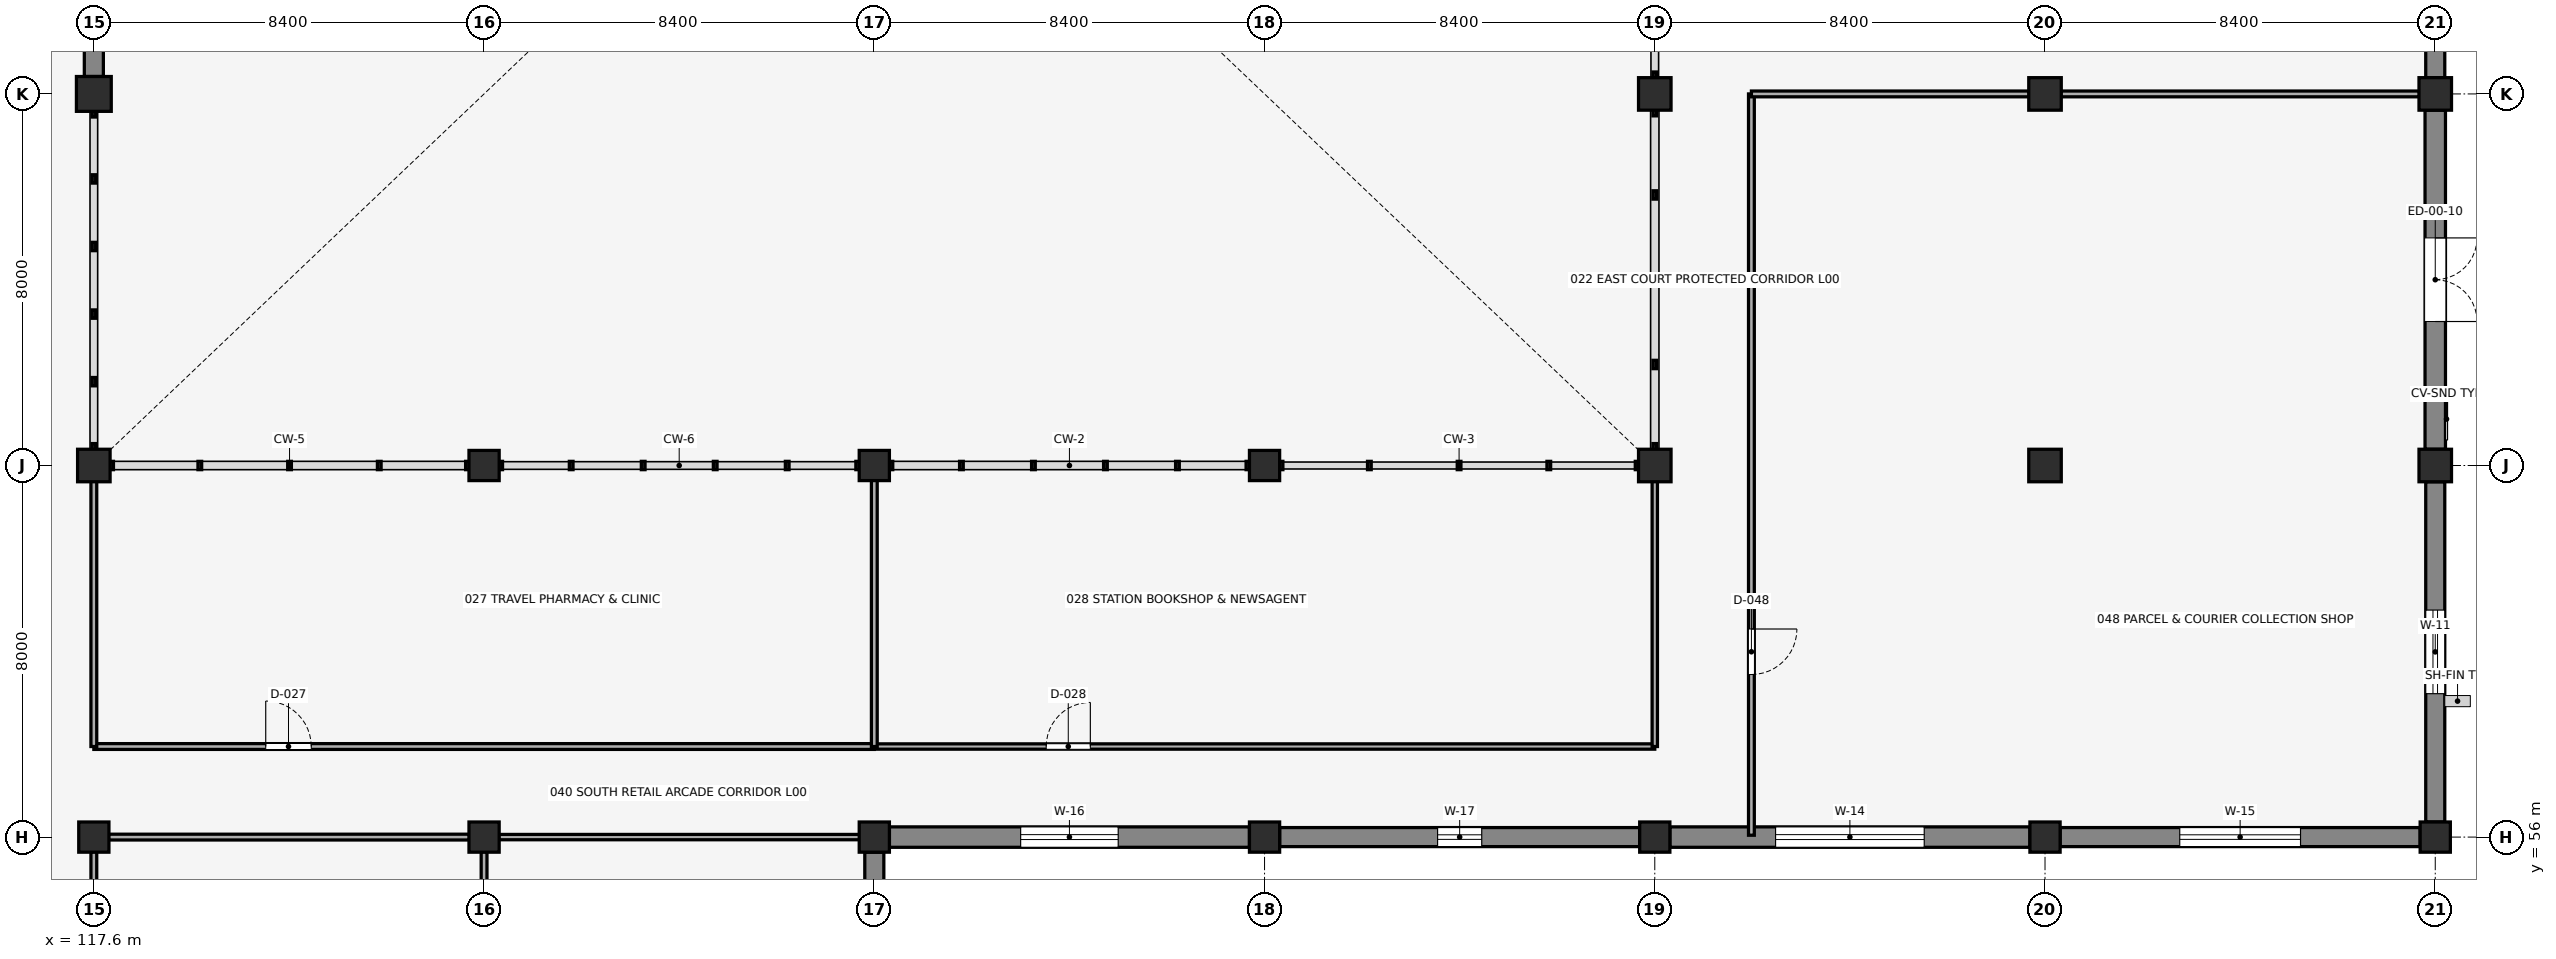
"""IFC4 building model, lengths in metres.
Left out: names, types, materials, properties, quantities, classifications, styles, units other than length and angle.
Written with IfcOpenShell. Run it as: python <this file> out.ifc"""

import sys

from ifc_helpers import new_model, si_unit, direction, frame, frame_2d, origin, origin_2d, place, context, subcontext, project, spatial, rectangle, circle, extrude, element, fill, save


model = new_model("IFC4")
c1 = context("Model", 3, precision=1e-05, world=origin(), true_north=direction((0.0, 1.0)))
c2 = subcontext(c1, "Body", "Model", "MODEL_VIEW")
j1 = project(units=[si_unit("LENGTHUNIT", "METRE"), si_unit("PLANEANGLEUNIT", "RADIAN")], contexts=[c1])
p1 = place(None, origin())
s1 = spatial("IfcSite", under=j1, at=p1, CompositionType="ELEMENT")
p2 = place(p1, origin())
s2 = spatial("IfcBuilding", under=s1, at=p2, CompositionType="ELEMENT")
p3 = place(p2, origin())
s3 = spatial("IfcBuildingStorey", under=s2, at=p3, CompositionType="ELEMENT", Elevation=0.0)
p4 = place(p3, frame((117.6, 56.0, 0.0), z_axis=(0.0, 0.0, 1.0), x_axis=(1.0, 0.0, 0.0)))
e1 = element("IfcColumn", 1, at=p4, inside=s3, PredefinedType="COLUMN", context=c2, shape_type="SweptSolid", body=[
    extrude(circle(Radius=0.325, at=origin_2d()), origin(), (0.0, 0.0, 1.0), 5.15),
])
p5 = place(p3, frame((117.6, 64.0, 0.0), z_axis=(0.0, 0.0, 1.0), x_axis=(1.0, 0.0, 0.0)))
e2 = element("IfcColumn", 2, at=p5, inside=s3, PredefinedType="COLUMN", context=c2, shape_type="SweptSolid", body=[
    extrude(rectangle(XDim=0.7, YDim=0.7, at=origin_2d()), origin(), (0.0, 0.0, 1.0), 5.15),
])
p6 = place(p3, frame((117.6, 72.0, 0.0), z_axis=(0.0, 0.0, 1.0), x_axis=(1.0, 0.0, 0.0)))
e3 = element("IfcColumn", 3, at=p6, inside=s3, PredefinedType="COLUMN", context=c2, shape_type="SweptSolid", body=[
    extrude(rectangle(XDim=0.75, YDim=0.75, at=origin_2d()), origin(), (0.0, 0.0, 1.0), 5.15),
])
for number, where, z_axis, x_axis in (
    (4, (126.0, 56.0, 0.0), (0.0, 0.0, 1.0), (1.0, 0.0, 0.0)),
    (5, (126.0, 64.0, 0.0), (0.0, 0.0, 1.0), (1.0, 0.0, 0.0)),
    (6, (134.4, 56.0, 0.0), (0.0, 0.0, 1.0), (1.0, 0.0, 0.0)),
    (7, (134.4, 64.0, 0.0), (0.0, 0.0, 1.0), (1.0, 0.0, 0.0)),
    (8, (142.8, 56.0, 0.0), (0.0, 0.0, 1.0), (1.0, 0.0, 0.0)),
    (9, (142.8, 64.0, 0.0), (0.0, 0.0, 1.0), (1.0, 0.0, 0.0)),
):
    element("IfcColumn", number, at=place(p3, frame(where, z_axis=z_axis, x_axis=x_axis)), inside=s3, PredefinedType="COLUMN", context=c2, shape_type="SweptSolid", body=[
        extrude(circle(Radius=0.325, at=origin_2d()), origin(), (0.0, 0.0, 1.0), 5.15),
    ])
p7 = place(p3, frame((151.2, 56.0, 0.0), z_axis=(0.0, 0.0, 1.0), x_axis=(1.0, 0.0, 0.0)))
e10 = element("IfcColumn", 10, at=p7, inside=s3, PredefinedType="COLUMN", context=c2, shape_type="SweptSolid", body=[
    extrude(rectangle(XDim=0.65, YDim=0.65, at=origin_2d()), origin(), (0.0, 0.0, 1.0), 5.15),
])
for number, where, z_axis, x_axis in (
    (11, (151.2, 64.0, 0.0), (0.0, 0.0, 1.0), (1.0, 0.0, 0.0)),
    (12, (151.2, 72.0, 0.0), (0.0, 0.0, 1.0), (1.0, 0.0, 0.0)),
):
    element("IfcColumn", number, at=place(p3, frame(where, z_axis=z_axis, x_axis=x_axis)), inside=s3, PredefinedType="COLUMN", context=c2, shape_type="SweptSolid", body=[
        extrude(rectangle(XDim=0.7, YDim=0.7, at=origin_2d()), origin(), (0.0, 0.0, 1.0), 5.15),
    ])
p8 = place(p3, frame((159.6, 56.0, 0.0), z_axis=(0.0, 0.0, 1.0), x_axis=(1.0, 0.0, 0.0)))
e13 = element("IfcColumn", 13, at=p8, inside=s3, PredefinedType="COLUMN", context=c2, shape_type="SweptSolid", body=[
    extrude(rectangle(XDim=0.65, YDim=0.65, at=origin_2d()), origin(), (0.0, 0.0, 1.0), 5.15),
])
for number, where, z_axis, x_axis in (
    (14, (159.6, 64.0, 0.0), (0.0, 0.0, 1.0), (1.0, 0.0, 0.0)),
    (15, (159.6, 72.0, 0.0), (0.0, 0.0, 1.0), (1.0, 0.0, 0.0)),
):
    element("IfcColumn", number, at=place(p3, frame(where, z_axis=z_axis, x_axis=x_axis)), inside=s3, PredefinedType="COLUMN", context=c2, shape_type="SweptSolid", body=[
        extrude(rectangle(XDim=0.7, YDim=0.7, at=origin_2d()), origin(), (0.0, 0.0, 1.0), 5.15),
    ])
p9 = place(p3, frame((168.0, 56.0, 0.0), z_axis=(0.0, 0.0, 1.0), x_axis=(1.0, 0.0, 0.0)))
e16 = element("IfcColumn", 16, at=p9, inside=s3, PredefinedType="COLUMN", context=c2, shape_type="SweptSolid", body=[
    extrude(rectangle(XDim=0.65, YDim=0.65, at=origin_2d()), origin(), (0.0, 0.0, 1.0), 5.15),
])
for number, where, z_axis, x_axis in (
    (17, (168.0, 64.0, 0.0), (0.0, 0.0, 1.0), (1.0, 0.0, 0.0)),
    (18, (168.0, 72.0, 0.0), (0.0, 0.0, 1.0), (1.0, 0.0, 0.0)),
):
    element("IfcColumn", number, at=place(p3, frame(where, z_axis=z_axis, x_axis=x_axis)), inside=s3, PredefinedType="COLUMN", context=c2, shape_type="SweptSolid", body=[
        extrude(rectangle(XDim=0.7, YDim=0.7, at=origin_2d()), origin(), (0.0, 0.0, 1.0), 5.15),
    ])
p10 = place(p3, frame((168.0, 56.325, 0.0), z_axis=(0.0, 0.0, 1.0), x_axis=(0.0, 1.0, 0.0)))
e19 = element("IfcWall", 19, at=p10, inside=s3, PredefinedType="SOLIDWALL", context=c2, shape_type="SweptSolid", body=[
    extrude(rectangle(XDim=7.325, YDim=0.41, at=frame_2d((3.663, 0.0))), origin(), (0.0, 0.0, 1.0), 4.747),
])
p11 = place(p10, frame((2.762, 0.0, 0.9), z_axis=(0.0, 0.0, 1.0), x_axis=(1.0, 0.0, 0.0)))
e20 = element("IfcOpeningElement", 20, at=p11, cuts=e19, PredefinedType="OPENING", context=c2, shape_type="SweptSolid", body=[
    extrude(rectangle(XDim=1.8, YDim=1.45, at=frame_2d((0.9, 0.725))), frame((0.0, 0.215, 0.0), z_axis=(0.0, -1.0, 0.0), x_axis=(1.0, 0.0, 0.0)), (0.0, 0.0, 1.0), 0.43),
])
p12 = place(p3, frame((168.0, 64.35, 0.0), z_axis=(0.0, 0.0, 1.0), x_axis=(0.0, 1.0, 0.0)))
e21 = element("IfcWall", 21, at=p12, inside=s3, PredefinedType="SOLIDWALL", context=c2, shape_type="SweptSolid", body=[
    extrude(rectangle(XDim=7.3, YDim=0.44, at=frame_2d((3.65, 0.0))), origin(), (0.0, 0.0, 1.0), 4.747),
])
p13 = place(p12, frame((4.55, 0.0, 0.0), z_axis=(0.0, 0.0, 1.0), x_axis=(-1.0, 0.0, 0.0)))
e22 = element("IfcOpeningElement", 22, at=p13, cuts=e21, PredefinedType="OPENING", context=c2, shape_type="SweptSolid", body=[
    extrude(rectangle(XDim=1.8, YDim=2.2, at=frame_2d((0.9, 1.1))), frame((0.0, 0.23, 0.0), z_axis=(0.0, -1.0, 0.0), x_axis=(1.0, 0.0, 0.0)), (0.0, 0.0, 1.0), 0.46),
])
p14 = place(p3, frame((168.0, 72.35, 0.0), z_axis=(0.0, 0.0, 1.0), x_axis=(0.0, 1.0, 0.0)))
e23 = element("IfcWall", 23, at=p14, inside=s3, PredefinedType="SOLIDWALL", context=c2, shape_type="SweptSolid", body=[
    extrude(rectangle(XDim=7.3, YDim=0.41, at=frame_2d((3.65, 0.0))), origin(), (0.0, 0.0, 1.0), 4.85),
])
p15 = place(p3, frame((151.525, 56.0, 0.0), z_axis=(0.0, 0.0, 1.0), x_axis=(1.0, 0.0, 0.0)))
e24 = element("IfcWall", 24, at=p15, inside=s3, PredefinedType="SOLIDWALL", context=c2, shape_type="SweptSolid", body=[
    extrude(rectangle(XDim=7.75, YDim=0.44, at=frame_2d((3.875, 0.0))), origin(), (0.0, 0.0, 1.0), 4.74),
])
p16 = place(p15, frame((2.275, 0.0, 1.55), z_axis=(0.0, 0.0, 1.0), x_axis=(1.0, 0.0, 0.0)))
e25 = element("IfcOpeningElement", 25, at=p16, cuts=e24, PredefinedType="OPENING", context=c2, shape_type="SweptSolid", body=[
    extrude(rectangle(XDim=3.2, YDim=0.9, at=frame_2d((1.6, 0.45))), frame((0.0, 0.23, 0.0), z_axis=(0.0, -1.0, 0.0), x_axis=(1.0, 0.0, 0.0)), (0.0, 0.0, 1.0), 0.46),
])
p17 = place(p3, frame((159.925, 56.0, 0.0), z_axis=(0.0, 0.0, 1.0), x_axis=(1.0, 0.0, 0.0)))
e26 = element("IfcWall", 26, at=p17, inside=s3, PredefinedType="SOLIDWALL", context=c2, shape_type="SweptSolid", body=[
    extrude(rectangle(XDim=7.75, YDim=0.41, at=frame_2d((3.875, 0.0))), origin(), (0.0, 0.0, 1.0), 4.74),
])
p18 = place(p17, frame((2.575, 0.0, 1.55), z_axis=(0.0, 0.0, 1.0), x_axis=(1.0, 0.0, 0.0)))
e27 = element("IfcOpeningElement", 27, at=p18, cuts=e26, PredefinedType="OPENING", context=c2, shape_type="SweptSolid", body=[
    extrude(rectangle(XDim=2.6, YDim=0.85, at=frame_2d((1.3, 0.425))), frame((0.0, 0.215, 0.0), z_axis=(0.0, -1.0, 0.0), x_axis=(1.0, 0.0, 0.0)), (0.0, 0.0, 1.0), 0.43),
])
p19 = place(p3, frame((134.725, 56.0, 0.0), z_axis=(0.0, 0.0, 1.0), x_axis=(1.0, 0.0, 0.0)))
e28 = element("IfcWall", 28, at=p19, inside=s3, PredefinedType="SOLIDWALL", context=c2, shape_type="SweptSolid", body=[
    extrude(rectangle(XDim=7.75, YDim=0.44, at=frame_2d((3.875, 0.0))), origin(), (0.0, 0.0, 1.0), 4.74),
])
p20 = place(p19, frame((2.825, 0.0, 1.55), z_axis=(0.0, 0.0, 1.0), x_axis=(1.0, 0.0, 0.0)))
e29 = element("IfcOpeningElement", 29, at=p20, cuts=e28, PredefinedType="OPENING", context=c2, shape_type="SweptSolid", body=[
    extrude(rectangle(XDim=2.1, YDim=0.8, at=frame_2d((1.05, 0.4))), frame((0.0, 0.23, 0.0), z_axis=(0.0, -1.0, 0.0), x_axis=(1.0, 0.0, 0.0)), (0.0, 0.0, 1.0), 0.46),
])
p21 = place(p3, frame((143.125, 56.0, 0.0), z_axis=(0.0, 0.0, 1.0), x_axis=(1.0, 0.0, 0.0)))
e30 = element("IfcWall", 30, at=p21, inside=s3, PredefinedType="SOLIDWALL", context=c2, shape_type="SweptSolid", body=[
    extrude(rectangle(XDim=7.75, YDim=0.41, at=frame_2d((3.875, 0.0))), origin(), (0.0, 0.0, 1.0), 4.74),
])
p22 = place(p21, frame((3.4, 0.0, 0.65), z_axis=(0.0, 0.0, 1.0), x_axis=(1.0, 0.0, 0.0)))
e31 = element("IfcOpeningElement", 31, at=p22, cuts=e30, PredefinedType="OPENING", context=c2, shape_type="SweptSolid", body=[
    extrude(rectangle(XDim=0.95, YDim=2.1, at=frame_2d((0.475, 1.05))), frame((0.0, 0.215, 0.0), z_axis=(0.0, -1.0, 0.0), x_axis=(1.0, 0.0, 0.0)), (0.0, 0.0, 1.0), 0.43),
])
p23 = place(p3, frame((134.4, 48.325, 0.0), z_axis=(0.0, 0.0, 1.0), x_axis=(0.0, 1.0, 0.0)))
e32 = element("IfcWall", 32, at=p23, inside=s3, PredefinedType="SOLIDWALL", context=c2, shape_type="SweptSolid", body=[
    extrude(rectangle(XDim=7.35, YDim=0.41, at=frame_2d((3.675, 0.0))), origin(), (0.0, 0.0, 1.0), 4.747),
])
p24 = place(p23, frame((3.075, 0.0, 1.55), z_axis=(0.0, 0.0, 1.0), x_axis=(1.0, 0.0, 0.0)))
e33 = element("IfcOpeningElement", 33, at=p24, cuts=e32, PredefinedType="OPENING", context=c2, shape_type="SweptSolid", body=[
    extrude(rectangle(XDim=1.2, YDim=0.95, at=frame_2d((0.6, 0.475))), frame((0.0, 0.215, 0.0), z_axis=(0.0, -1.0, 0.0), x_axis=(1.0, 0.0, 0.0)), (0.0, 0.0, 1.0), 0.43),
])
p25 = place(p3, frame((117.6, 72.375, 0.0), z_axis=(0.0, 0.0, 1.0), x_axis=(0.0, 1.0, 0.0)))
e34 = element("IfcWall", 34, at=p25, inside=s3, PredefinedType="SOLIDWALL", context=c2, shape_type="SweptSolid", body=[
    extrude(rectangle(XDim=7.25, YDim=0.41, at=frame_2d((3.625, 0.0))), origin(), (0.0, 0.0, 1.0), 4.85),
])
p26 = place(p3, frame((117.6, 57.95, 0.0), z_axis=(0.0, 0.0, 1.0), x_axis=(1.0, 0.0, 0.0)))
e35 = element("IfcWall", 35, at=p26, inside=s3, PredefinedType="PARTITIONING", context=c2, shape_type="SweptSolid", body=[
    extrude(rectangle(XDim=16.8, YDim=0.125, at=frame_2d((8.4, 0.0))), origin(), (0.0, 0.0, 1.0), 5.15),
])
p27 = place(p26, frame((3.7, 0.0, 0.0), z_axis=(0.0, 0.0, 1.0), x_axis=(1.0, 0.0, 0.0)))
e36 = element("IfcOpeningElement", 36, at=p27, cuts=e35, PredefinedType="OPENING", context=c2, shape_type="SweptSolid", body=[
    extrude(rectangle(XDim=0.98, YDim=2.15, at=frame_2d((0.49, 1.075))), frame((0.0, 0.073, 0.0), z_axis=(0.0, -1.0, 0.0), x_axis=(1.0, 0.0, 0.0)), (0.0, 0.0, 1.0), 0.145),
])
p28 = place(p3, frame((134.4, 57.95, 0.0), z_axis=(0.0, 0.0, 1.0), x_axis=(1.0, 0.0, 0.0)))
e37 = element("IfcWall", 37, at=p28, inside=s3, PredefinedType="PARTITIONING", context=c2, shape_type="SweptSolid", body=[
    extrude(rectangle(XDim=16.8, YDim=0.115, at=frame_2d((8.4, 0.0))), origin(), (0.0, 0.0, 1.0), 4.542),
])
p29 = place(p28, frame((3.7, 0.0, 0.0), z_axis=(0.0, 0.0, 1.0), x_axis=(1.0, 0.0, 0.0)))
e38 = element("IfcOpeningElement", 38, at=p29, cuts=e37, PredefinedType="OPENING", context=c2, shape_type="SweptSolid", body=[
    extrude(rectangle(XDim=0.95, YDim=2.15, at=frame_2d((0.475, 1.075))), frame((0.0, 0.067, 0.0), z_axis=(0.0, -1.0, 0.0), x_axis=(1.0, 0.0, 0.0)), (0.0, 0.0, 1.0), 0.135),
])
p30 = place(p3, frame((153.28, 56.04, 0.0), z_axis=(0.0, 0.0, 1.0), x_axis=(0.0, 1.0, 0.0)))
e39 = element("IfcWall", 39, at=p30, inside=s3, PredefinedType="PARTITIONING", context=c2, shape_type="SweptSolid", body=[
    extrude(rectangle(XDim=15.96, YDim=0.125, at=frame_2d((7.98, 0.0))), origin(), (0.0, 0.0, 1.0), 5.15),
])
p31 = place(p30, frame((4.44, 0.0, 0.0), z_axis=(0.0, 0.0, 1.0), x_axis=(-1.0, 0.0, 0.0)))
e40 = element("IfcOpeningElement", 40, at=p31, cuts=e39, PredefinedType="OPENING", context=c2, shape_type="SweptSolid", body=[
    extrude(rectangle(XDim=0.98, YDim=2.15, at=frame_2d((0.49, 1.075))), frame((0.0, 0.073, 0.0), z_axis=(0.0, -1.0, 0.0), x_axis=(1.0, 0.0, 0.0)), (0.0, 0.0, 1.0), 0.145),
])
p32 = place(p3, frame((117.915, 56.0, 0.0), z_axis=(0.0, 0.0, 1.0), x_axis=(1.0, 0.0, 0.0)))
e41 = element("IfcWall", 41, at=p32, inside=s3, PredefinedType="PARTITIONING", context=c2, shape_type="SweptSolid", body=[
    extrude(rectangle(XDim=7.77, YDim=0.125, at=frame_2d((3.885, 0.0))), origin(), (0.0, 0.0, 1.0), 4.605),
])
for number, where, z_axis, x_axis in (
    (42, (117.6, 50.2, 0.0), (0.0, 0.0, 1.0), (0.0, 1.0, 0.0)),
    (43, (126.0, 50.2, 0.0), (0.0, 0.0, 1.0), (0.0, 1.0, 0.0)),
):
    element("IfcWall", number, at=place(p3, frame(where, z_axis=z_axis, x_axis=x_axis)), inside=s3, PredefinedType="PARTITIONING", context=c2, shape_type="SweptSolid", body=[
        extrude(rectangle(XDim=5.485, YDim=0.125, at=frame_2d((2.743, 0.0))), origin(), (0.0, 0.0, 1.0), 4.542),
    ])
p33 = place(p3, frame((126.315, 56.0, 0.0), z_axis=(0.0, 0.0, 1.0), x_axis=(1.0, 0.0, 0.0)))
e44 = element("IfcWall", 44, at=p33, inside=s3, PredefinedType="PARTITIONING", context=c2, shape_type="SweptSolid", body=[
    extrude(rectangle(XDim=7.77, YDim=0.115, at=frame_2d((3.885, 0.0))), origin(), (0.0, 0.0, 1.0), 4.605),
])
p34 = place(p3, frame((117.6, 57.95, 0.0), z_axis=(0.0, 0.0, 1.0), x_axis=(0.0, 1.0, 0.0)))
e45 = element("IfcWall", 45, at=p34, inside=s3, PredefinedType="PARTITIONING", context=c2, shape_type="SweptSolid", body=[
    extrude(rectangle(XDim=5.71, YDim=0.125, at=frame_2d((2.855, 0.0))), origin(), (0.0, 0.0, 1.0), 4.542),
])
p35 = place(p3, frame((134.4, 57.95, 0.0), z_axis=(0.0, 0.0, 1.0), x_axis=(0.0, 1.0, 0.0)))
e46 = element("IfcWall", 46, at=p35, inside=s3, PredefinedType="PARTITIONING", context=c2, shape_type="SweptSolid", body=[
    extrude(rectangle(XDim=5.735, YDim=0.125, at=frame_2d((2.868, 0.0))), origin(), (0.0, 0.0, 1.0), 4.542),
])
p36 = place(p3, frame((151.2, 57.95, 0.0), z_axis=(0.0, 0.0, 1.0), x_axis=(0.0, 1.0, 0.0)))
e47 = element("IfcWall", 47, at=p36, inside=s3, PredefinedType="PARTITIONING", context=c2, shape_type="SweptSolid", body=[
    extrude(rectangle(XDim=5.71, YDim=0.115, at=frame_2d((2.855, 0.0))), origin(), (0.0, 0.0, 1.0), 4.542),
])
p37 = place(p3, frame((153.28, 72.0, 0.0), z_axis=(0.0, 0.0, 1.0), x_axis=(1.0, 0.0, 0.0)))
e48 = element("IfcWall", 48, at=p37, inside=s3, PredefinedType="PARTITIONING", context=c2, shape_type="SweptSolid", body=[
    extrude(rectangle(XDim=5.98, YDim=0.125, at=frame_2d((2.99, 0.0))), origin(), (0.0, 0.0, 1.0), 4.605),
])
p38 = place(p3, frame((159.94, 72.0, 0.0), z_axis=(0.0, 0.0, 1.0), x_axis=(1.0, 0.0, 0.0)))
e49 = element("IfcWall", 49, at=p38, inside=s3, PredefinedType="PARTITIONING", context=c2, shape_type="SweptSolid", body=[
    extrude(rectangle(XDim=7.72, YDim=0.125, at=frame_2d((3.86, 0.0))), origin(), (0.0, 0.0, 1.0), 4.605),
])
p39 = place(p11, origin())
e50 = element("IfcWindow", 50, at=p39, inside=s3, PartitioningType="DOUBLE_PANEL_VERTICAL", PredefinedType="WINDOW", context=c2, shape_type="SweptSolid", body=[
    extrude(rectangle(XDim=1.8, YDim=1.45, at=frame_2d((0.9, 0.725))), frame((0.0, 0.03, 0.0), z_axis=(0.0, -1.0, 0.0), x_axis=(1.0, 0.0, 0.0)), (0.0, 0.0, 1.0), 0.06),
])
fill(e20, e50)
p40 = place(p13, origin())
e51 = element("IfcDoor", 51, at=p40, inside=s3, OperationType="DOUBLE_DOOR_SINGLE_SWING", PredefinedType="DOOR", context=c2, shape_type="SweptSolid", body=[
    extrude(rectangle(XDim=1.8, YDim=2.2, at=frame_2d((0.9, 1.1))), frame((0.0, 0.025, 0.0), z_axis=(0.0, -1.0, 0.0), x_axis=(1.0, 0.0, 0.0)), (0.0, 0.0, 1.0), 0.05),
])
fill(e22, e51)
p41 = place(p16, origin())
e52 = element("IfcWindow", 52, at=p41, inside=s3, PartitioningType="TRIPLE_PANEL_HORIZONTAL", PredefinedType="WINDOW", context=c2, shape_type="SweptSolid", body=[
    extrude(rectangle(XDim=3.2, YDim=0.9, at=frame_2d((1.6, 0.45))), frame((0.0, 0.03, 0.0), z_axis=(0.0, -1.0, 0.0), x_axis=(1.0, 0.0, 0.0)), (0.0, 0.0, 1.0), 0.06),
])
fill(e25, e52)
p42 = place(p18, origin())
e53 = element("IfcWindow", 53, at=p42, inside=s3, PartitioningType="DOUBLE_PANEL_HORIZONTAL", PredefinedType="WINDOW", context=c2, shape_type="SweptSolid", body=[
    extrude(rectangle(XDim=2.6, YDim=0.85, at=frame_2d((1.3, 0.425))), frame((0.0, 0.03, 0.0), z_axis=(0.0, -1.0, 0.0), x_axis=(1.0, 0.0, 0.0)), (0.0, 0.0, 1.0), 0.06),
])
fill(e27, e53)
p43 = place(p20, origin())
e54 = element("IfcWindow", 54, at=p43, inside=s3, PartitioningType="DOUBLE_PANEL_HORIZONTAL", PredefinedType="WINDOW", context=c2, shape_type="SweptSolid", body=[
    extrude(rectangle(XDim=2.1, YDim=0.8, at=frame_2d((1.05, 0.4))), frame((0.0, 0.03, 0.0), z_axis=(0.0, -1.0, 0.0), x_axis=(1.0, 0.0, 0.0)), (0.0, 0.0, 1.0), 0.06),
])
fill(e29, e54)
p44 = place(p22, origin())
e55 = element("IfcWindow", 55, at=p44, inside=s3, PartitioningType="SINGLE_PANEL", PredefinedType="WINDOW", context=c2, shape_type="SweptSolid", body=[
    extrude(rectangle(XDim=0.95, YDim=2.1, at=frame_2d((0.475, 1.05))), frame((0.0, 0.03, 0.0), z_axis=(0.0, -1.0, 0.0), x_axis=(1.0, 0.0, 0.0)), (0.0, 0.0, 1.0), 0.06),
])
fill(e31, e55)
p45 = place(p27, origin())
e56 = element("IfcDoor", 56, at=p45, inside=s3, OperationType="SINGLE_SWING_LEFT", PredefinedType="DOOR", context=c2, shape_type="SweptSolid", body=[
    extrude(rectangle(XDim=0.98, YDim=2.15, at=frame_2d((0.49, 1.075))), frame((0.0, 0.025, 0.0), z_axis=(0.0, -1.0, 0.0), x_axis=(1.0, 0.0, 0.0)), (0.0, 0.0, 1.0), 0.05),
])
fill(e36, e56)
p46 = place(p29, origin())
e57 = element("IfcDoor", 57, at=p46, inside=s3, OperationType="SINGLE_SWING_RIGHT", PredefinedType="DOOR", context=c2, shape_type="SweptSolid", body=[
    extrude(rectangle(XDim=0.95, YDim=2.15, at=frame_2d((0.475, 1.075))), frame((0.0, 0.025, 0.0), z_axis=(0.0, -1.0, 0.0), x_axis=(1.0, 0.0, 0.0)), (0.0, 0.0, 1.0), 0.05),
])
fill(e38, e57)
p47 = place(p31, origin())
e58 = element("IfcDoor", 58, at=p47, inside=s3, OperationType="SINGLE_SWING_LEFT", PredefinedType="DOOR", context=c2, shape_type="SweptSolid", body=[
    extrude(rectangle(XDim=0.98, YDim=2.15, at=frame_2d((0.49, 1.075))), frame((0.0, 0.025, 0.0), z_axis=(0.0, -1.0, 0.0), x_axis=(1.0, 0.0, 0.0)), (0.0, 0.0, 1.0), 0.05),
])
fill(e40, e58)
save(model, sys.argv[1])
